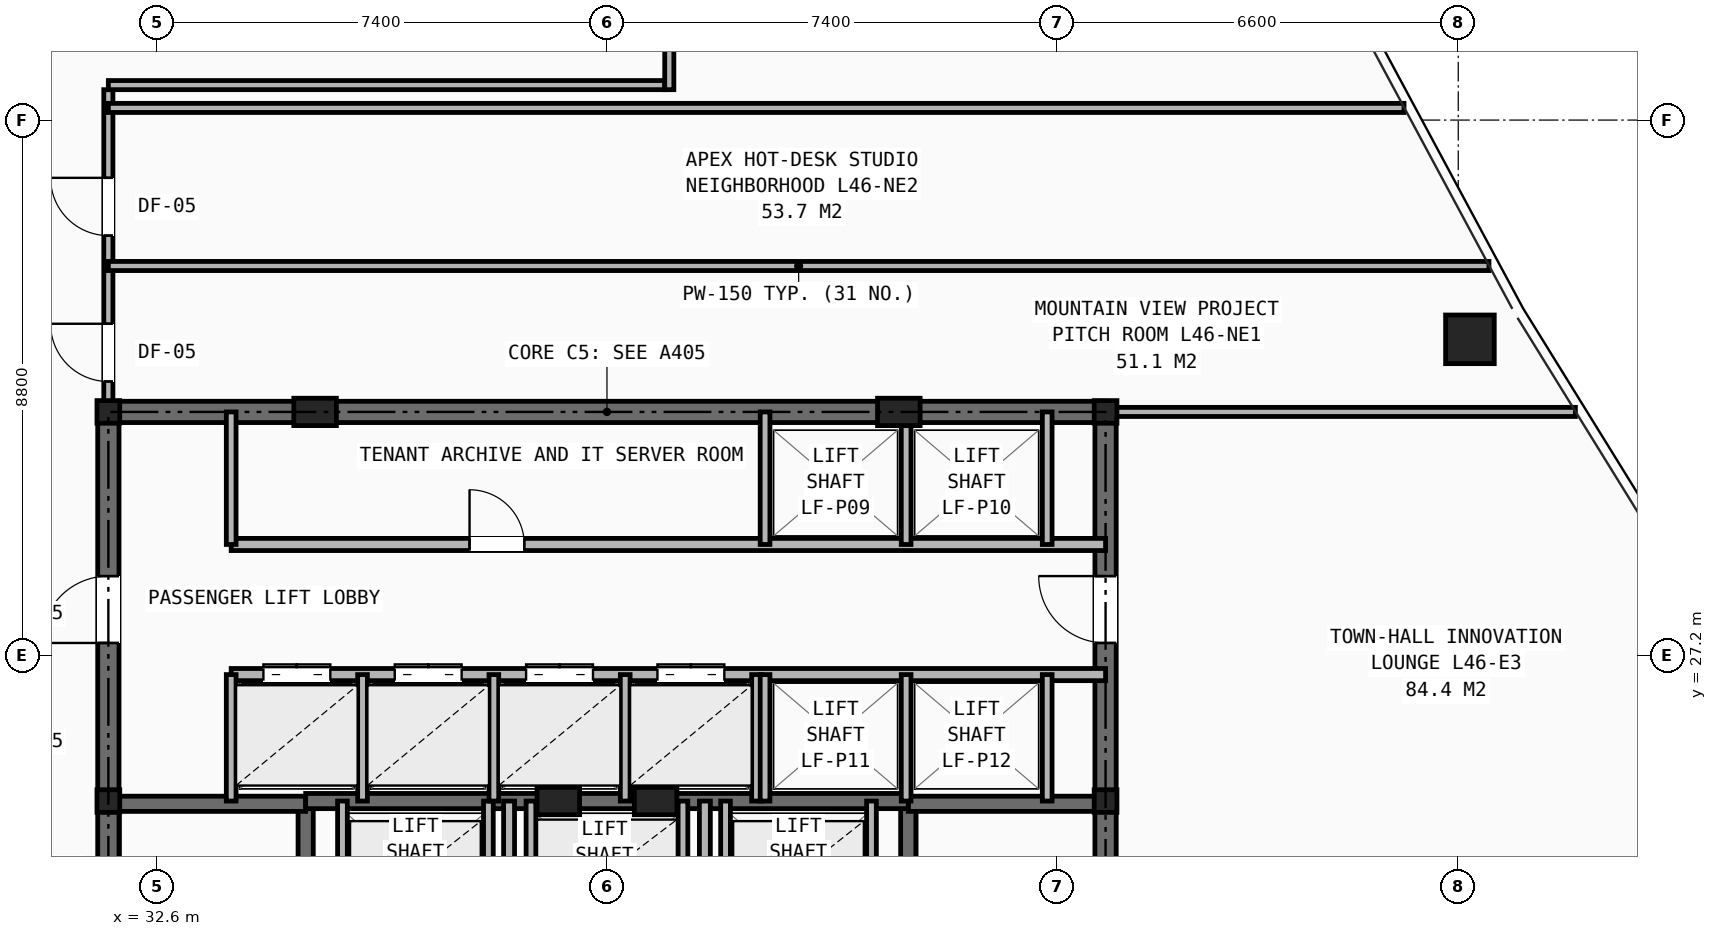
"""IFC4 building model, lengths in metres.
Left out: names, types, materials, properties, quantities, classifications, styles, units other than length and angle.
Written with IfcOpenShell. Run it as: python <this file> out.ifc"""

import sys

from ifc_helpers import new_model, si_unit, direction, frame, frame_2d, origin, origin_2d, place, context, subcontext, project, spatial, rectangle, hollow_rectangle, i_section, extrude, element, fill, save


model = new_model("IFC4")
c1 = context("Model", 3, precision=1e-05, world=origin(), true_north=direction((0.0, 1.0)))
c2 = subcontext(c1, "Body", "Model", "MODEL_VIEW")
j1 = project(units=[si_unit("LENGTHUNIT", "METRE"), si_unit("PLANEANGLEUNIT", "RADIAN")], contexts=[c1])
p1 = place(None, origin())
s1 = spatial("IfcSite", under=j1, at=p1, CompositionType="ELEMENT")
p2 = place(p1, origin())
s2 = spatial("IfcBuilding", under=s1, at=p2, CompositionType="ELEMENT")
p3 = place(p2, frame((0.0, 0.0, 162.0)))
s3 = spatial("IfcBuildingStorey", under=s2, at=p3, CompositionType="ELEMENT", Elevation=162.0)
for number, where, z_axis, x_axis in (
    (1, (31.8, 24.8, 0.0), (0.0, 0.0, 1.0), (1.0, 0.0, 0.0)),
    (2, (48.2, 24.8, 0.0), (0.0, 0.0, 1.0), (1.0, 0.0, 0.0)),
    (3, (31.8, 31.2, 0.0), (0.0, 0.0, 1.0), (1.0, 0.0, 0.0)),
    (4, (48.2, 31.2, 0.0), (0.0, 0.0, 1.0), (1.0, 0.0, 0.0)),
):
    element("IfcColumn", number, at=place(p3, frame(where, z_axis=z_axis, x_axis=x_axis)), inside=s3, PredefinedType="COLUMN", context=c2, shape_type="SweptSolid", body=[
        extrude(i_section(OverallWidth=0.374, OverallDepth=0.372, WebThickness=0.016, FlangeThickness=0.026, at=origin_2d()), origin(), (0.0, 0.0, 1.0), 3.45),
    ])
for number, where, z_axis, x_axis in (
    (5, (35.2, 31.2, 0.0), (0.0, 0.0, 1.0), (1.0, 0.0, 0.0)),
    (6, (44.8, 31.2, 0.0), (0.0, 0.0, 1.0), (1.0, 0.0, 0.0)),
    (7, (39.2, 24.8, 0.0), (0.0, 0.0, 1.0), (1.0, 0.0, 0.0)),
    (8, (40.8, 24.8, 0.0), (0.0, 0.0, 1.0), (1.0, 0.0, 0.0)),
):
    element("IfcColumn", number, at=place(p3, frame(where, z_axis=z_axis, x_axis=x_axis)), inside=s3, PredefinedType="PILASTER", context=c2, shape_type="SweptSolid", body=[
        extrude(rectangle(XDim=0.7, YDim=0.45, at=origin_2d()), origin(), (0.0, 0.0, 1.0), 3.45),
    ])
p4 = place(p3, frame((54.192, 32.394, 0.0), z_axis=(0.0, 0.0, 1.0), x_axis=(1.0, 0.0, 0.0)))
e9 = element("IfcColumn", 9, at=p4, inside=s3, PredefinedType="COLUMN", context=c2, shape_type="SweptSolid", body=[
    extrude(hollow_rectangle(XDim=0.8, YDim=0.8, WallThickness=0.055, at=origin_2d()), origin(), (0.0, 0.0, 1.0), 3.45),
])
p5 = place(p3, frame((31.8, 31.2, 0.0), z_axis=(0.0, 0.0, 1.0), x_axis=(1.0, 0.0, 0.0)))
e10 = element("IfcWall", 10, at=p5, inside=s3, PredefinedType="SHEAR", context=c2, shape_type="SweptSolid", body=[
    extrude(rectangle(XDim=16.4, YDim=0.35, at=frame_2d((8.2, 0.0))), origin(), (0.0, 0.0, 1.0), 3.21),
])
p6 = place(p3, frame((31.8, 16.4, 0.0), z_axis=(0.0, 0.0, 1.0), x_axis=(0.0, 1.0, 0.0)))
e11 = element("IfcWall", 11, at=p6, inside=s3, PredefinedType="SHEAR", context=c2, shape_type="SweptSolid", body=[
    extrude(rectangle(XDim=14.8, YDim=0.35, at=frame_2d((7.4, 0.0))), origin(), (0.0, 0.0, 1.0), 3.21),
])
p7 = place(p6, frame((11.0, 0.0, 0.0)))
e12 = element("IfcOpeningElement", 12, at=p7, cuts=e11, PredefinedType="OPENING", context=c2, shape_type="SweptSolid", body=[
    extrude(rectangle(XDim=1.1, YDim=2.15, at=frame_2d((0.55, 1.075))), frame((0.0, 0.185, 0.0), z_axis=(0.0, -1.0, 0.0), x_axis=(1.0, 0.0, 0.0)), (0.0, 0.0, 1.0), 0.37),
])
p8 = place(p3, frame((48.2, 16.4, 0.0), z_axis=(0.0, 0.0, 1.0), x_axis=(0.0, 1.0, 0.0)))
e13 = element("IfcWall", 13, at=p8, inside=s3, PredefinedType="SHEAR", context=c2, shape_type="SweptSolid", body=[
    extrude(rectangle(XDim=14.8, YDim=0.35, at=frame_2d((7.4, 0.0))), origin(), (0.0, 0.0, 1.0), 3.21),
])
p9 = place(p8, frame((11.0, 0.0, 0.0)))
e14 = element("IfcOpeningElement", 14, at=p9, cuts=e13, PredefinedType="OPENING", context=c2, shape_type="SweptSolid", body=[
    extrude(rectangle(XDim=1.1, YDim=2.15, at=frame_2d((0.55, 1.075))), frame((0.0, 0.185, 0.0), z_axis=(0.0, -1.0, 0.0), x_axis=(1.0, 0.0, 0.0)), (0.0, 0.0, 1.0), 0.37),
])
p10 = place(p3, frame((35.045, 16.4, 0.0), z_axis=(0.0, 0.0, 1.0), x_axis=(0.0, 1.0, 0.0)))
e15 = element("IfcWall", 15, at=p10, inside=s3, PredefinedType="SHEAR", context=c2, shape_type="SweptSolid", body=[
    extrude(rectangle(XDim=8.4, YDim=0.25, at=frame_2d((4.2, 0.0))), origin(), (0.0, 0.0, 1.0), 3.21),
])
p11 = place(p10, frame((0.45, 0.0, 0.0)))
e16 = element("IfcOpeningElement", 16, at=p11, cuts=e15, PredefinedType="OPENING", context=c2, shape_type="SweptSolid", body=[
    extrude(rectangle(XDim=0.95, YDim=2.1, at=frame_2d((0.475, 1.05))), frame((0.0, 0.135, 0.0), z_axis=(0.0, -1.0, 0.0), x_axis=(1.0, 0.0, 0.0)), (0.0, 0.0, 1.0), 0.27),
])
p12 = place(p3, frame((31.8, 24.755, 0.0), z_axis=(0.0, 0.0, 1.0), x_axis=(1.0, 0.0, 0.0)))
e17 = element("IfcWall", 17, at=p12, inside=s3, PredefinedType="SHEAR", context=c2, shape_type="SweptSolid", body=[
    extrude(rectangle(XDim=3.245, YDim=0.25, at=frame_2d((1.623, 0.0))), origin(), (0.0, 0.0, 1.0), 3.21),
])
p13 = place(p3, frame((44.955, 16.4, 0.0), z_axis=(0.0, 0.0, 1.0), x_axis=(0.0, 1.0, 0.0)))
e18 = element("IfcWall", 18, at=p13, inside=s3, PredefinedType="SHEAR", context=c2, shape_type="SweptSolid", body=[
    extrude(rectangle(XDim=8.4, YDim=0.25, at=frame_2d((4.2, 0.0))), origin(), (0.0, 0.0, 1.0), 3.21),
])
p14 = place(p13, frame((0.45, 0.0, 0.0)))
e19 = element("IfcOpeningElement", 19, at=p14, cuts=e18, PredefinedType="OPENING", context=c2, shape_type="SweptSolid", body=[
    extrude(rectangle(XDim=0.95, YDim=2.1, at=frame_2d((0.475, 1.05))), frame((0.0, 0.135, 0.0), z_axis=(0.0, -1.0, 0.0), x_axis=(1.0, 0.0, 0.0)), (0.0, 0.0, 1.0), 0.27),
])
p15 = place(p3, frame((44.955, 24.755, 0.0), z_axis=(0.0, 0.0, 1.0), x_axis=(1.0, 0.0, 0.0)))
e20 = element("IfcWall", 20, at=p15, inside=s3, PredefinedType="SHEAR", context=c2, shape_type="SweptSolid", body=[
    extrude(rectangle(XDim=3.245, YDim=0.25, at=frame_2d((1.623, 0.0))), origin(), (0.0, 0.0, 1.0), 3.21),
])
p16 = place(p3, frame((35.045, 24.8, 0.0), z_axis=(0.0, 0.0, 1.0), x_axis=(1.0, 0.0, 0.0)))
e21 = element("IfcWall", 21, at=p16, inside=s3, PredefinedType="SHEAR", context=c2, shape_type="SweptSolid", body=[
    extrude(rectangle(XDim=9.91, YDim=0.25, at=frame_2d((4.955, 0.0))), origin(), (0.0, 0.0, 1.0), 3.21),
])
p17 = place(p3, frame((38.39, 16.4, 0.0), z_axis=(0.0, 0.0, 1.0), x_axis=(0.0, 1.0, 0.0)))
e22 = element("IfcWall", 22, at=p17, inside=s3, PredefinedType="PARTITIONING", context=c2, shape_type="SweptSolid", body=[
    extrude(rectangle(XDim=8.4, YDim=0.18, at=frame_2d((4.2, 0.0))), origin(), (0.0, 0.0, 1.0), 2.665),
])
p18 = place(p17, frame((1.8, 0.0, 0.0)))
e23 = element("IfcOpeningElement", 23, at=p18, cuts=e22, PredefinedType="OPENING", context=c2, shape_type="SweptSolid", body=[
    extrude(rectangle(XDim=0.85, YDim=2.05, at=frame_2d((0.425, 1.025))), frame((0.0, 0.1, 0.0), z_axis=(0.0, -1.0, 0.0), x_axis=(1.0, 0.0, 0.0)), (0.0, 0.0, 1.0), 0.2),
])
p19 = place(p17, frame((4.35, 0.0, 0.0)))
e24 = element("IfcOpeningElement", 24, at=p19, cuts=e22, PredefinedType="OPENING", context=c2, shape_type="SweptSolid", body=[
    extrude(rectangle(XDim=0.95, YDim=2.1, at=frame_2d((0.475, 1.05))), frame((0.0, 0.1, 0.0), z_axis=(0.0, -1.0, 0.0), x_axis=(1.0, 0.0, 0.0)), (0.0, 0.0, 1.0), 0.2),
])
p20 = place(p3, frame((41.61, 16.4, 0.0), z_axis=(0.0, 0.0, 1.0), x_axis=(0.0, 1.0, 0.0)))
e25 = element("IfcWall", 25, at=p20, inside=s3, PredefinedType="PARTITIONING", context=c2, shape_type="SweptSolid", body=[
    extrude(rectangle(XDim=8.4, YDim=0.18, at=frame_2d((4.2, 0.0))), origin(), (0.0, 0.0, 1.0), 2.665),
])
p21 = place(p20, frame((1.8, 0.0, 0.0)))
e26 = element("IfcOpeningElement", 26, at=p21, cuts=e25, PredefinedType="OPENING", context=c2, shape_type="SweptSolid", body=[
    extrude(rectangle(XDim=0.85, YDim=2.05, at=frame_2d((0.425, 1.025))), frame((0.0, 0.1, 0.0), z_axis=(0.0, -1.0, 0.0), x_axis=(1.0, 0.0, 0.0)), (0.0, 0.0, 1.0), 0.2),
])
for number, where, z_axis, x_axis in (
    (27, (35.65, 22.48, 0.0), (0.0, 0.0, 1.0), (0.0, 1.0, 0.0)),
    (28, (38.05, 22.48, 0.0), (0.0, 0.0, 1.0), (0.0, 1.0, 0.0)),
    (29, (41.95, 22.48, 0.0), (0.0, 0.0, 1.0), (0.0, 1.0, 0.0)),
    (30, (44.35, 22.48, 0.0), (0.0, 0.0, 1.0), (0.0, 1.0, 0.0)),
    (31, (38.75, 22.48, 0.0), (0.0, 0.0, 1.0), (0.0, 1.0, 0.0)),
    (32, (41.25, 22.48, 0.0), (0.0, 0.0, 1.0), (0.0, 1.0, 0.0)),
):
    element("IfcWall", number, at=place(p3, frame(where, z_axis=z_axis, x_axis=x_axis)), inside=s3, PredefinedType="SOLIDWALL", context=c2, shape_type="SweptSolid", body=[
        extrude(rectangle(XDim=2.32, YDim=0.16, at=frame_2d((1.16, 0.0))), origin(), (0.0, 0.0, 1.0), 3.21),
    ])
p22 = place(p3, frame((33.82, 29.02, 0.0), z_axis=(0.0, 0.0, 1.0), x_axis=(1.0, 0.0, 0.0)))
e33 = element("IfcWall", 33, at=p22, inside=s3, PredefinedType="SOLIDWALL", context=c2, shape_type="SweptSolid", body=[
    extrude(rectangle(XDim=14.38, YDim=0.2, at=frame_2d((7.19, 0.0))), origin(), (0.0, 0.0, 1.0), 2.665),
])
p23 = place(p22, frame((3.92, 0.0, 0.0)))
e34 = element("IfcOpeningElement", 34, at=p23, cuts=e33, PredefinedType="OPENING", context=c2, shape_type="SweptSolid", body=[
    extrude(rectangle(XDim=0.9, YDim=2.1, at=frame_2d((0.45, 1.05))), frame((0.0, 0.11, 0.0), z_axis=(0.0, -1.0, 0.0), x_axis=(1.0, 0.0, 0.0)), (0.0, 0.0, 1.0), 0.22),
])
p24 = place(p3, frame((33.82, 26.88, 0.0), z_axis=(0.0, 0.0, 1.0), x_axis=(1.0, 0.0, 0.0)))
e35 = element("IfcWall", 35, at=p24, inside=s3, PredefinedType="SOLIDWALL", context=c2, shape_type="SweptSolid", body=[
    extrude(rectangle(XDim=14.38, YDim=0.2, at=frame_2d((7.19, 0.0))), origin(), (0.0, 0.0, 1.0), 2.665),
])
p25 = place(p24, frame((0.53, 0.0, 0.0)))
e36 = element("IfcOpeningElement", 36, at=p25, cuts=e35, PredefinedType="OPENING", context=c2, shape_type="SweptSolid", body=[
    extrude(rectangle(XDim=1.1, YDim=2.15, at=frame_2d((0.55, 1.075))), frame((0.0, 0.11, 0.0), z_axis=(0.0, -1.0, 0.0), x_axis=(1.0, 0.0, 0.0)), (0.0, 0.0, 1.0), 0.22),
])
p26 = place(p24, frame((2.69, 0.0, 0.0)))
e37 = element("IfcOpeningElement", 37, at=p26, cuts=e35, PredefinedType="OPENING", context=c2, shape_type="SweptSolid", body=[
    extrude(rectangle(XDim=1.1, YDim=2.15, at=frame_2d((0.55, 1.075))), frame((0.0, 0.11, 0.0), z_axis=(0.0, -1.0, 0.0), x_axis=(1.0, 0.0, 0.0)), (0.0, 0.0, 1.0), 0.22),
])
p27 = place(p24, frame((4.85, 0.0, 0.0)))
e38 = element("IfcOpeningElement", 38, at=p27, cuts=e35, PredefinedType="OPENING", context=c2, shape_type="SweptSolid", body=[
    extrude(rectangle(XDim=1.1, YDim=2.15, at=frame_2d((0.55, 1.075))), frame((0.0, 0.11, 0.0), z_axis=(0.0, -1.0, 0.0), x_axis=(1.0, 0.0, 0.0)), (0.0, 0.0, 1.0), 0.22),
])
p28 = place(p24, frame((7.01, 0.0, 0.0)))
e39 = element("IfcOpeningElement", 39, at=p28, cuts=e35, PredefinedType="OPENING", context=c2, shape_type="SweptSolid", body=[
    extrude(rectangle(XDim=1.1, YDim=2.15, at=frame_2d((0.55, 1.075))), frame((0.0, 0.11, 0.0), z_axis=(0.0, -1.0, 0.0), x_axis=(1.0, 0.0, 0.0)), (0.0, 0.0, 1.0), 0.22),
])
p29 = place(p3, frame((33.82, 29.02, 0.0), z_axis=(0.0, 0.0, 1.0), x_axis=(0.0, 1.0, 0.0)))
e40 = element("IfcWall", 40, at=p29, inside=s3, PredefinedType="SOLIDWALL", context=c2, shape_type="SweptSolid", body=[
    extrude(rectangle(XDim=2.18, YDim=0.16, at=frame_2d((1.09, 0.0))), origin(), (0.0, 0.0, 1.0), 2.665),
])
for number, where, z_axis, x_axis in (
    (41, (33.82, 24.8, 0.0), (0.0, 0.0, 1.0), (0.0, 1.0, 0.0)),
    (42, (35.98, 24.8, 0.0), (0.0, 0.0, 1.0), (0.0, 1.0, 0.0)),
    (43, (38.14, 24.8, 0.0), (0.0, 0.0, 1.0), (0.0, 1.0, 0.0)),
    (44, (40.3, 24.8, 0.0), (0.0, 0.0, 1.0), (0.0, 1.0, 0.0)),
    (45, (42.46, 24.8, 0.0), (0.0, 0.0, 1.0), (0.0, 1.0, 0.0)),
):
    element("IfcWall", number, at=place(p3, frame(where, z_axis=z_axis, x_axis=x_axis)), inside=s3, PredefinedType="SOLIDWALL", context=c2, shape_type="SweptSolid", body=[
        extrude(rectangle(XDim=2.08, YDim=0.16, at=frame_2d((1.04, 0.0))), origin(), (0.0, 0.0, 1.0), 3.21),
    ])
for number, where, z_axis, x_axis in (
    (46, (42.6, 29.02, 0.0), (0.0, 0.0, 1.0), (0.0, 1.0, 0.0)),
    (47, (44.92, 29.02, 0.0), (0.0, 0.0, 1.0), (0.0, 1.0, 0.0)),
    (48, (47.24, 29.02, 0.0), (0.0, 0.0, 1.0), (0.0, 1.0, 0.0)),
):
    element("IfcWall", number, at=place(p3, frame(where, z_axis=z_axis, x_axis=x_axis)), inside=s3, PredefinedType="SOLIDWALL", context=c2, shape_type="SweptSolid", body=[
        extrude(rectangle(XDim=2.18, YDim=0.16, at=frame_2d((1.09, 0.0))), origin(), (0.0, 0.0, 1.0), 2.665),
    ])
for number, where, z_axis, x_axis in (
    (49, (42.6, 24.8, 0.0), (0.0, 0.0, 1.0), (0.0, 1.0, 0.0)),
    (50, (44.92, 24.8, 0.0), (0.0, 0.0, 1.0), (0.0, 1.0, 0.0)),
    (51, (47.24, 24.8, 0.0), (0.0, 0.0, 1.0), (0.0, 1.0, 0.0)),
):
    element("IfcWall", number, at=place(p3, frame(where, z_axis=z_axis, x_axis=x_axis)), inside=s3, PredefinedType="SOLIDWALL", context=c2, shape_type="SweptSolid", body=[
        extrude(rectangle(XDim=2.08, YDim=0.16, at=frame_2d((1.04, 0.0))), origin(), (0.0, 0.0, 1.0), 3.21),
    ])
p30 = place(p3, frame((31.8, 31.2, 0.0), z_axis=(0.0, 0.0, 1.0), x_axis=(0.0, 1.0, 0.0)))
e52 = element("IfcWall", 52, at=p30, inside=s3, PredefinedType="PARTITIONING", context=c2, shape_type="SweptSolid", body=[
    extrude(rectangle(XDim=5.3, YDim=0.15, at=frame_2d((2.65, 0.0))), origin(), (0.0, 0.0, 1.0), 2.252),
])
p31 = place(p30, frame((0.5, 0.0, 0.0)))
e53 = element("IfcOpeningElement", 53, at=p31, cuts=e52, PredefinedType="OPENING", context=c2, shape_type="SweptSolid", body=[
    extrude(rectangle(XDim=0.95, YDim=2.1, at=frame_2d((0.475, 1.05))), frame((0.0, 0.085, 0.0), z_axis=(0.0, -1.0, 0.0), x_axis=(1.0, 0.0, 0.0)), (0.0, 0.0, 1.0), 0.17),
])
p32 = place(p30, frame((2.9, 0.0, 0.0)))
e54 = element("IfcOpeningElement", 54, at=p32, cuts=e52, PredefinedType="OPENING", context=c2, shape_type="SweptSolid", body=[
    extrude(rectangle(XDim=0.95, YDim=2.1, at=frame_2d((0.475, 1.05))), frame((0.0, 0.085, 0.0), z_axis=(0.0, -1.0, 0.0), x_axis=(1.0, 0.0, 0.0)), (0.0, 0.0, 1.0), 0.17),
])
p33 = place(p3, frame((48.2, 31.2, 0.0), z_axis=(0.0, 0.0, 1.0), x_axis=(1.0, 0.0, 0.0)))
e55 = element("IfcWall", 55, at=p33, inside=s3, PredefinedType="PARTITIONING", context=c2, shape_type="SweptSolid", body=[
    extrude(rectangle(XDim=7.727, YDim=0.15, at=frame_2d((3.863, 0.0))), origin(), (0.0, 0.0, 1.0), 2.252),
])
p34 = place(p3, frame((31.8, 33.6, 0.0), z_axis=(0.0, 0.0, 1.0), x_axis=(1.0, 0.0, 0.0)))
e56 = element("IfcWall", 56, at=p34, inside=s3, PredefinedType="PARTITIONING", context=c2, shape_type="SweptSolid", body=[
    extrude(rectangle(XDim=22.705, YDim=0.15, at=frame_2d((11.353, 0.0))), origin(), (0.0, 0.0, 1.0), 2.589),
])
p35 = place(p3, frame((31.8, 36.2, 0.0), z_axis=(0.0, 0.0, 1.0), x_axis=(1.0, 0.0, 0.0)))
e57 = element("IfcWall", 57, at=p35, inside=s3, PredefinedType="PARTITIONING", context=c2, shape_type="SweptSolid", body=[
    extrude(rectangle(XDim=21.308, YDim=0.15, at=frame_2d((10.654, 0.0))), origin(), (0.0, 0.0, 1.0), 2.589),
])
p36 = place(p3, frame((31.8, 36.575, 0.0), z_axis=(0.0, 0.0, 1.0), x_axis=(1.0, 0.0, 0.0)))
e58 = element("IfcWall", 58, at=p36, inside=s3, PredefinedType="PARTITIONING", context=c2, shape_type="SweptSolid", body=[
    extrude(rectangle(XDim=9.15, YDim=0.15, at=frame_2d((4.575, 0.0))), origin(), (0.0, 0.0, 1.0), 3.21),
])
p37 = place(p3, frame((41.025, 36.5, 0.0), z_axis=(0.0, 0.0, 1.0), x_axis=(0.0, 1.0, 0.0)))
e59 = element("IfcWall", 59, at=p37, inside=s3, PredefinedType="PARTITIONING", context=c2, shape_type="SweptSolid", body=[
    extrude(rectangle(XDim=1.95, YDim=0.15, at=frame_2d((0.975, 0.0))), origin(), (0.0, 0.0, 1.0), 3.21),
])
p38 = place(p7, origin())
e60 = element("IfcDoor", 60, at=p38, inside=s3, OperationType="SINGLE_SWING_LEFT", PredefinedType="DOOR", context=c2, shape_type="SweptSolid", body=[
    extrude(rectangle(XDim=1.1, YDim=2.15, at=frame_2d((0.55, 1.075))), frame((0.0, 0.025, 0.0), z_axis=(0.0, -1.0, 0.0), x_axis=(1.0, 0.0, 0.0)), (0.0, 0.0, 1.0), 0.05),
])
fill(e12, e60)
p39 = place(p9, origin())
e61 = element("IfcDoor", 61, at=p39, inside=s3, OperationType="SINGLE_SWING_RIGHT", PredefinedType="DOOR", context=c2, shape_type="SweptSolid", body=[
    extrude(rectangle(XDim=1.1, YDim=2.15, at=frame_2d((0.55, 1.075))), frame((0.0, 0.025, 0.0), z_axis=(0.0, -1.0, 0.0), x_axis=(1.0, 0.0, 0.0)), (0.0, 0.0, 1.0), 0.05),
])
fill(e14, e61)
p40 = place(p23, origin())
e62 = element("IfcDoor", 62, at=p40, inside=s3, OperationType="SINGLE_SWING_LEFT", PredefinedType="DOOR", context=c2, shape_type="SweptSolid", body=[
    extrude(rectangle(XDim=0.9, YDim=2.1, at=frame_2d((0.45, 1.05))), frame((0.0, 0.025, 0.0), z_axis=(0.0, -1.0, 0.0), x_axis=(1.0, 0.0, 0.0)), (0.0, 0.0, 1.0), 0.05),
])
fill(e34, e62)
p41 = place(p25, origin())
e63 = element("IfcDoor", 63, at=p41, inside=s3, OperationType="DOUBLE_DOOR_SLIDING", PredefinedType="DOOR", context=c2, shape_type="SweptSolid", body=[
    extrude(rectangle(XDim=1.1, YDim=2.15, at=frame_2d((0.55, 1.075))), frame((0.0, 0.025, 0.0), z_axis=(0.0, -1.0, 0.0), x_axis=(1.0, 0.0, 0.0)), (0.0, 0.0, 1.0), 0.05),
])
fill(e36, e63)
p42 = place(p26, origin())
e64 = element("IfcDoor", 64, at=p42, inside=s3, OperationType="DOUBLE_DOOR_SLIDING", PredefinedType="DOOR", context=c2, shape_type="SweptSolid", body=[
    extrude(rectangle(XDim=1.1, YDim=2.15, at=frame_2d((0.55, 1.075))), frame((0.0, 0.025, 0.0), z_axis=(0.0, -1.0, 0.0), x_axis=(1.0, 0.0, 0.0)), (0.0, 0.0, 1.0), 0.05),
])
fill(e37, e64)
p43 = place(p27, origin())
e65 = element("IfcDoor", 65, at=p43, inside=s3, OperationType="DOUBLE_DOOR_SLIDING", PredefinedType="DOOR", context=c2, shape_type="SweptSolid", body=[
    extrude(rectangle(XDim=1.1, YDim=2.15, at=frame_2d((0.55, 1.075))), frame((0.0, 0.025, 0.0), z_axis=(0.0, -1.0, 0.0), x_axis=(1.0, 0.0, 0.0)), (0.0, 0.0, 1.0), 0.05),
])
fill(e38, e65)
p44 = place(p28, origin())
e66 = element("IfcDoor", 66, at=p44, inside=s3, OperationType="DOUBLE_DOOR_SLIDING", PredefinedType="DOOR", context=c2, shape_type="SweptSolid", body=[
    extrude(rectangle(XDim=1.1, YDim=2.15, at=frame_2d((0.55, 1.075))), frame((0.0, 0.025, 0.0), z_axis=(0.0, -1.0, 0.0), x_axis=(1.0, 0.0, 0.0)), (0.0, 0.0, 1.0), 0.05),
])
fill(e39, e66)
p45 = place(p31, origin())
e67 = element("IfcDoor", 67, at=p45, inside=s3, OperationType="SINGLE_SWING_RIGHT", PredefinedType="DOOR", context=c2, shape_type="SweptSolid", body=[
    extrude(rectangle(XDim=0.95, YDim=2.1, at=frame_2d((0.475, 1.05))), frame((0.0, 0.025, 0.0), z_axis=(0.0, -1.0, 0.0), x_axis=(1.0, 0.0, 0.0)), (0.0, 0.0, 1.0), 0.05),
])
fill(e53, e67)
p46 = place(p32, origin())
e68 = element("IfcDoor", 68, at=p46, inside=s3, OperationType="SINGLE_SWING_RIGHT", PredefinedType="DOOR", context=c2, shape_type="SweptSolid", body=[
    extrude(rectangle(XDim=0.95, YDim=2.1, at=frame_2d((0.475, 1.05))), frame((0.0, 0.025, 0.0), z_axis=(0.0, -1.0, 0.0), x_axis=(1.0, 0.0, 0.0)), (0.0, 0.0, 1.0), 0.05),
])
fill(e54, e68)
save(model, sys.argv[1])
